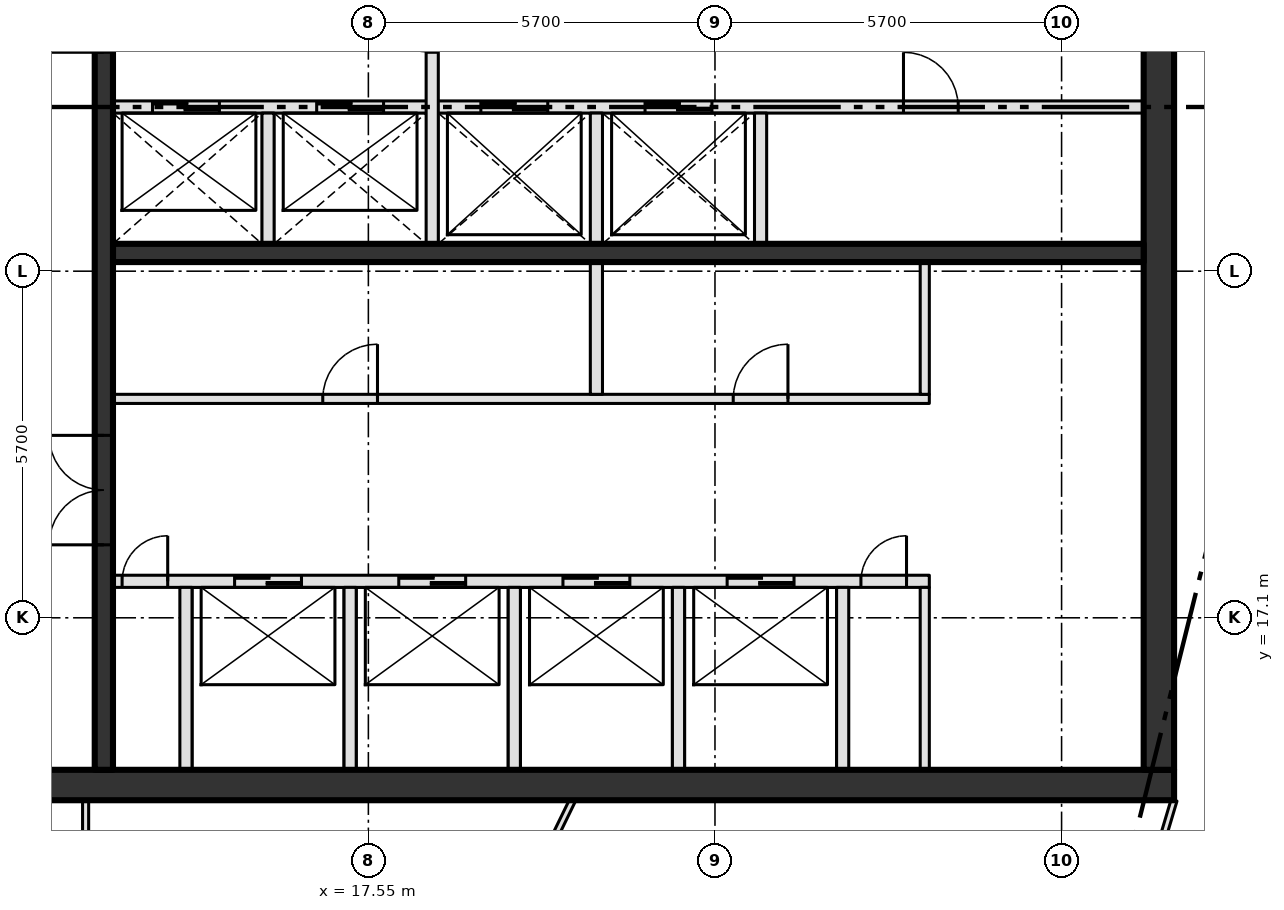
"""IFC4 building model, lengths in metres.
Left out: names, types, materials, properties, quantities, classifications, styles, units other than length and angle.
Written with IfcOpenShell. Run it as: python <this file> out.ifc"""

import sys

from ifc_helpers import new_model, si_unit, direction, frame, frame_2d, origin, place, context, subcontext, project, spatial, rectangle, extrude, element, fill, save


model = new_model("IFC4")
c1 = context("Model", 3, precision=1e-05, world=origin(), true_north=direction((0.0, 1.0)))
c2 = subcontext(c1, "Body", "Model", "MODEL_VIEW")
j1 = project(units=[si_unit("LENGTHUNIT", "METRE"), si_unit("PLANEANGLEUNIT", "RADIAN")], contexts=[c1])
p1 = place(None, origin())
s1 = spatial("IfcSite", under=j1, at=p1, CompositionType="ELEMENT")
p2 = place(p1, origin())
s2 = spatial("IfcBuilding", under=s1, at=p2, CompositionType="ELEMENT")
p3 = place(p2, frame((0.0, 0.0, 366.6)))
s3 = spatial("IfcBuildingStorey", under=s2, at=p3, CompositionType="ELEMENT", Elevation=366.6)
p4 = place(p3, frame((8.0, 14.35, -0.3), z_axis=(0.0, 0.0, 1.0), x_axis=(1.0, 0.0, 0.0)))
e1 = element("IfcWall", 1, at=p4, inside=s3, PredefinedType="SHEAR", context=c2, shape_type="SweptSolid", body=[
    extrude(rectangle(XDim=22.8, YDim=0.5, at=frame_2d((11.4, 0.0))), origin(), (0.0, 0.0, 1.0), 4.2),
])
p5 = place(p4, frame((2.3, 0.0, 0.3)))
e2 = element("IfcOpeningElement", 2, at=p5, cuts=e1, PredefinedType="OPENING", context=c2, shape_type="SweptSolid", body=[
    extrude(rectangle(XDim=1.8, YDim=2.1, at=frame_2d((0.9, 1.05))), frame((0.0, 0.26, 0.0), z_axis=(0.0, -1.0, 0.0), x_axis=(1.0, 0.0, 0.0)), (0.0, 0.0, 1.0), 0.52),
])
p6 = place(p3, frame((30.55, 14.6, -0.3), z_axis=(0.0, 0.0, 1.0), x_axis=(0.0, 1.0, 0.0)))
e3 = element("IfcWall", 3, at=p6, inside=s3, PredefinedType="SHEAR", context=c2, shape_type="SweptSolid", body=[
    extrude(rectangle(XDim=21.1, YDim=0.5, at=frame_2d((10.55, 0.0))), origin(), (0.0, 0.0, 1.0), 4.2),
])
p7 = place(p3, frame((13.35, 17.7, 0.0), z_axis=(0.0, 0.0, 1.0), x_axis=(1.0, 0.0, 0.0)))
e4 = element("IfcWall", 4, at=p7, inside=s3, PredefinedType="SOLIDWALL", context=c2, shape_type="SweptSolid", body=[
    extrude(rectangle(XDim=13.425, YDim=0.2, at=frame_2d((6.712, 0.0))), origin(), (0.0, 0.0, 1.0), 3.9),
])
p8 = place(p7, frame((2.0, 0.0, 0.0)))
e5 = element("IfcOpeningElement", 5, at=p8, cuts=e4, PredefinedType="OPENING", context=c2, shape_type="SweptSolid", body=[
    extrude(rectangle(XDim=1.1, YDim=2.1, at=frame_2d((0.55, 1.05))), frame((0.0, 0.11, 0.0), z_axis=(0.0, -1.0, 0.0), x_axis=(1.0, 0.0, 0.0)), (0.0, 0.0, 1.0), 0.22),
])
p9 = place(p7, frame((4.7, 0.0, 0.0)))
e6 = element("IfcOpeningElement", 6, at=p9, cuts=e4, PredefinedType="OPENING", context=c2, shape_type="SweptSolid", body=[
    extrude(rectangle(XDim=1.1, YDim=2.1, at=frame_2d((0.55, 1.05))), frame((0.0, 0.11, 0.0), z_axis=(0.0, -1.0, 0.0), x_axis=(1.0, 0.0, 0.0)), (0.0, 0.0, 1.0), 0.22),
])
p10 = place(p7, frame((7.4, 0.0, 0.0)))
e7 = element("IfcOpeningElement", 7, at=p10, cuts=e4, PredefinedType="OPENING", context=c2, shape_type="SweptSolid", body=[
    extrude(rectangle(XDim=1.1, YDim=2.1, at=frame_2d((0.55, 1.05))), frame((0.0, 0.11, 0.0), z_axis=(0.0, -1.0, 0.0), x_axis=(1.0, 0.0, 0.0)), (0.0, 0.0, 1.0), 0.22),
])
p11 = place(p7, frame((10.1, 0.0, 0.0)))
e8 = element("IfcOpeningElement", 8, at=p11, cuts=e4, PredefinedType="OPENING", context=c2, shape_type="SweptSolid", body=[
    extrude(rectangle(XDim=1.1, YDim=2.1, at=frame_2d((0.55, 1.05))), frame((0.0, 0.11, 0.0), z_axis=(0.0, -1.0, 0.0), x_axis=(1.0, 0.0, 0.0)), (0.0, 0.0, 1.0), 0.22),
])
p12 = place(p7, frame((0.15, 0.0, 0.0)))
e9 = element("IfcOpeningElement", 9, at=p12, cuts=e4, PredefinedType="OPENING", context=c2, shape_type="SweptSolid", body=[
    extrude(rectangle(XDim=0.75, YDim=2.1, at=frame_2d((0.375, 1.05))), frame((0.0, 0.11, 0.0), z_axis=(0.0, -1.0, 0.0), x_axis=(1.0, 0.0, 0.0)), (0.0, 0.0, 1.0), 0.22),
])
p13 = place(p7, frame((12.3, 0.0, 0.0)))
e10 = element("IfcOpeningElement", 10, at=p13, cuts=e4, PredefinedType="OPENING", context=c2, shape_type="SweptSolid", body=[
    extrude(rectangle(XDim=0.75, YDim=2.1, at=frame_2d((0.375, 1.05))), frame((0.0, 0.11, 0.0), z_axis=(0.0, -1.0, 0.0), x_axis=(1.0, 0.0, 0.0)), (0.0, 0.0, 1.0), 0.22),
])
p14 = place(p3, frame((13.35, 20.7, 0.0), z_axis=(0.0, 0.0, 1.0), x_axis=(1.0, 0.0, 0.0)))
e11 = element("IfcWall", 11, at=p14, inside=s3, PredefinedType="PARTITIONING", context=c2, shape_type="SweptSolid", body=[
    extrude(rectangle(XDim=13.425, YDim=0.15, at=frame_2d((6.712, 0.0))), origin(), (0.0, 0.0, 1.0), 3.9),
])
p15 = place(p14, frame((3.45, 0.0, 0.0)))
e12 = element("IfcOpeningElement", 12, at=p15, cuts=e11, PredefinedType="OPENING", context=c2, shape_type="SweptSolid", body=[
    extrude(rectangle(XDim=0.9, YDim=2.1, at=frame_2d((0.45, 1.05))), frame((0.0, 0.085, 0.0), z_axis=(0.0, -1.0, 0.0), x_axis=(1.0, 0.0, 0.0)), (0.0, 0.0, 1.0), 0.17),
])
p16 = place(p14, frame((10.2, 0.0, 0.0)))
e13 = element("IfcOpeningElement", 13, at=p16, cuts=e11, PredefinedType="OPENING", context=c2, shape_type="SweptSolid", body=[
    extrude(rectangle(XDim=0.9, YDim=2.1, at=frame_2d((0.45, 1.05))), frame((0.0, 0.085, 0.0), z_axis=(0.0, -1.0, 0.0), x_axis=(1.0, 0.0, 0.0)), (0.0, 0.0, 1.0), 0.17),
])
p17 = place(p3, frame((13.35, 23.1, 0.0), z_axis=(0.0, 0.0, 1.0), x_axis=(1.0, 0.0, 0.0)))
e14 = element("IfcWall", 14, at=p17, inside=s3, PredefinedType="SHEAR", context=c2, shape_type="SweptSolid", body=[
    extrude(rectangle(XDim=16.95, YDim=0.3, at=frame_2d((8.475, 0.0))), origin(), (0.0, 0.0, 1.0), 3.9),
])
p18 = place(p3, frame((13.35, 25.5, 0.0), z_axis=(0.0, 0.0, 1.0), x_axis=(1.0, 0.0, 0.0)))
e15 = element("IfcWall", 15, at=p18, inside=s3, PredefinedType="SOLIDWALL", context=c2, shape_type="SweptSolid", body=[
    extrude(rectangle(XDim=16.95, YDim=0.2, at=frame_2d((8.475, 0.0))), origin(), (0.0, 0.0, 1.0), 3.9),
])
p19 = place(p18, frame((0.65, 0.0, 0.0)))
e16 = element("IfcOpeningElement", 16, at=p19, cuts=e15, PredefinedType="OPENING", context=c2, shape_type="SweptSolid", body=[
    extrude(rectangle(XDim=1.1, YDim=2.1, at=frame_2d((0.55, 1.05))), frame((0.0, 0.11, 0.0), z_axis=(0.0, -1.0, 0.0), x_axis=(1.0, 0.0, 0.0)), (0.0, 0.0, 1.0), 0.22),
])
p20 = place(p18, frame((3.35, 0.0, 0.0)))
e17 = element("IfcOpeningElement", 17, at=p20, cuts=e15, PredefinedType="OPENING", context=c2, shape_type="SweptSolid", body=[
    extrude(rectangle(XDim=1.1, YDim=2.1, at=frame_2d((0.55, 1.05))), frame((0.0, 0.11, 0.0), z_axis=(0.0, -1.0, 0.0), x_axis=(1.0, 0.0, 0.0)), (0.0, 0.0, 1.0), 0.22),
])
p21 = place(p18, frame((6.05, 0.0, 0.0)))
e18 = element("IfcOpeningElement", 18, at=p21, cuts=e15, PredefinedType="OPENING", context=c2, shape_type="SweptSolid", body=[
    extrude(rectangle(XDim=1.1, YDim=2.1, at=frame_2d((0.55, 1.05))), frame((0.0, 0.11, 0.0), z_axis=(0.0, -1.0, 0.0), x_axis=(1.0, 0.0, 0.0)), (0.0, 0.0, 1.0), 0.22),
])
p22 = place(p18, frame((8.75, 0.0, 0.0)))
e19 = element("IfcOpeningElement", 19, at=p22, cuts=e15, PredefinedType="OPENING", context=c2, shape_type="SweptSolid", body=[
    extrude(rectangle(XDim=1.1, YDim=2.1, at=frame_2d((0.55, 1.05))), frame((0.0, 0.11, 0.0), z_axis=(0.0, -1.0, 0.0), x_axis=(1.0, 0.0, 0.0)), (0.0, 0.0, 1.0), 0.22),
])
p23 = place(p18, frame((13.0, 0.0, 0.0)))
e20 = element("IfcOpeningElement", 20, at=p23, cuts=e15, PredefinedType="OPENING", context=c2, shape_type="SweptSolid", body=[
    extrude(rectangle(XDim=0.9, YDim=2.1, at=frame_2d((0.45, 1.05))), frame((0.0, 0.11, 0.0), z_axis=(0.0, -1.0, 0.0), x_axis=(1.0, 0.0, 0.0)), (0.0, 0.0, 1.0), 0.22),
])
p24 = place(p3, frame((13.2, 14.6, 0.0), z_axis=(0.0, 0.0, 1.0), x_axis=(0.0, 1.0, 0.0)))
e21 = element("IfcWall", 21, at=p24, inside=s3, PredefinedType="SHEAR", context=c2, shape_type="SweptSolid", body=[
    extrude(rectangle(XDim=21.1, YDim=0.3, at=frame_2d((10.55, 0.0))), origin(), (0.0, 0.0, 1.0), 3.9),
])
p25 = place(p24, frame((3.7, 0.0, 0.0)))
e22 = element("IfcOpeningElement", 22, at=p25, cuts=e21, PredefinedType="OPENING", context=c2, shape_type="SweptSolid", body=[
    extrude(rectangle(XDim=1.8, YDim=2.1, at=frame_2d((0.9, 1.05))), frame((0.0, 0.16, 0.0), z_axis=(0.0, -1.0, 0.0), x_axis=(1.0, 0.0, 0.0)), (0.0, 0.0, 1.0), 0.32),
])
p26 = place(p24, frame((11.8, 0.0, 0.0)))
e23 = element("IfcOpeningElement", 23, at=p26, cuts=e21, PredefinedType="OPENING", context=c2, shape_type="SweptSolid", body=[
    extrude(rectangle(XDim=1.2, YDim=2.1, at=frame_2d((0.6, 1.05))), frame((0.0, 0.16, 0.0), z_axis=(0.0, -1.0, 0.0), x_axis=(1.0, 0.0, 0.0)), (0.0, 0.0, 1.0), 0.32),
])
p27 = place(p3, frame((14.55, 14.6, 0.0), z_axis=(0.0, 0.0, 1.0), x_axis=(0.0, 1.0, 0.0)))
e24 = element("IfcWall", 24, at=p27, inside=s3, PredefinedType="SOLIDWALL", context=c2, shape_type="SweptSolid", body=[
    extrude(rectangle(XDim=3.0, YDim=0.2, at=frame_2d((1.5, 0.0))), origin(), (0.0, 0.0, 1.0), 3.9),
])
p28 = place(p3, frame((15.9, 23.25, 0.0), z_axis=(0.0, 0.0, 1.0), x_axis=(0.0, 1.0, 0.0)))
e25 = element("IfcWall", 25, at=p28, inside=s3, PredefinedType="SOLIDWALL", context=c2, shape_type="SweptSolid", body=[
    extrude(rectangle(XDim=2.15, YDim=0.2, at=frame_2d((1.075, 0.0))), origin(), (0.0, 0.0, 1.0), 3.9),
])
p29 = place(p3, frame((17.25, 14.6, 0.0), z_axis=(0.0, 0.0, 1.0), x_axis=(0.0, 1.0, 0.0)))
e26 = element("IfcWall", 26, at=p29, inside=s3, PredefinedType="SOLIDWALL", context=c2, shape_type="SweptSolid", body=[
    extrude(rectangle(XDim=3.0, YDim=0.2, at=frame_2d((1.5, 0.0))), origin(), (0.0, 0.0, 1.0), 3.9),
])
p30 = place(p3, frame((18.6, 23.25, 0.0), z_axis=(0.0, 0.0, 1.0), x_axis=(0.0, 1.0, 0.0)))
e27 = element("IfcWall", 27, at=p30, inside=s3, PredefinedType="SOLIDWALL", context=c2, shape_type="SweptSolid", body=[
    extrude(rectangle(XDim=5.15, YDim=0.2, at=frame_2d((2.575, 0.0))), origin(), (0.0, 0.0, 1.0), 3.9),
])
p31 = place(p30, frame((3.15, 0.0, 0.0)))
e28 = element("IfcOpeningElement", 28, at=p31, cuts=e27, PredefinedType="OPENING", context=c2, shape_type="SweptSolid", body=[
    extrude(rectangle(XDim=1.2, YDim=2.1, at=frame_2d((0.6, 1.05))), frame((0.0, 0.11, 0.0), z_axis=(0.0, -1.0, 0.0), x_axis=(1.0, 0.0, 0.0)), (0.0, 0.0, 1.0), 0.22),
])
p32 = place(p3, frame((19.95, 14.6, 0.0), z_axis=(0.0, 0.0, 1.0), x_axis=(0.0, 1.0, 0.0)))
e29 = element("IfcWall", 29, at=p32, inside=s3, PredefinedType="SOLIDWALL", context=c2, shape_type="SweptSolid", body=[
    extrude(rectangle(XDim=3.0, YDim=0.2, at=frame_2d((1.5, 0.0))), origin(), (0.0, 0.0, 1.0), 3.9),
])
p33 = place(p3, frame((21.3, 20.775, 0.0), z_axis=(0.0, 0.0, 1.0), x_axis=(0.0, 1.0, 0.0)))
e30 = element("IfcWall", 30, at=p33, inside=s3, PredefinedType="SOLIDWALL", context=c2, shape_type="SweptSolid", body=[
    extrude(rectangle(XDim=4.625, YDim=0.2, at=frame_2d((2.312, 0.0))), origin(), (0.0, 0.0, 1.0), 3.9),
])
p34 = place(p3, frame((22.65, 14.6, 0.0), z_axis=(0.0, 0.0, 1.0), x_axis=(0.0, 1.0, 0.0)))
e31 = element("IfcWall", 31, at=p34, inside=s3, PredefinedType="SOLIDWALL", context=c2, shape_type="SweptSolid", body=[
    extrude(rectangle(XDim=3.0, YDim=0.2, at=frame_2d((1.5, 0.0))), origin(), (0.0, 0.0, 1.0), 3.9),
])
p35 = place(p3, frame((24.0, 23.25, 0.0), z_axis=(0.0, 0.0, 1.0), x_axis=(0.0, 1.0, 0.0)))
e32 = element("IfcWall", 32, at=p35, inside=s3, PredefinedType="SOLIDWALL", context=c2, shape_type="SweptSolid", body=[
    extrude(rectangle(XDim=2.15, YDim=0.2, at=frame_2d((1.075, 0.0))), origin(), (0.0, 0.0, 1.0), 3.9),
])
p36 = place(p3, frame((25.35, 14.6, 0.0), z_axis=(0.0, 0.0, 1.0), x_axis=(0.0, 1.0, 0.0)))
e33 = element("IfcWall", 33, at=p36, inside=s3, PredefinedType="SOLIDWALL", context=c2, shape_type="SweptSolid", body=[
    extrude(rectangle(XDim=3.0, YDim=0.2, at=frame_2d((1.5, 0.0))), origin(), (0.0, 0.0, 1.0), 3.9),
])
p37 = place(p3, frame((26.7, 14.6, 0.0), z_axis=(0.0, 0.0, 1.0), x_axis=(0.0, 1.0, 0.0)))
e34 = element("IfcWall", 34, at=p37, inside=s3, PredefinedType="PARTITIONING", context=c2, shape_type="SweptSolid", body=[
    extrude(rectangle(XDim=3.0, YDim=0.15, at=frame_2d((1.5, 0.0))), origin(), (0.0, 0.0, 1.0), 3.9),
])
p38 = place(p3, frame((26.7, 20.775, 0.0), z_axis=(0.0, 0.0, 1.0), x_axis=(0.0, 1.0, 0.0)))
e35 = element("IfcWall", 35, at=p38, inside=s3, PredefinedType="PARTITIONING", context=c2, shape_type="SweptSolid", body=[
    extrude(rectangle(XDim=2.175, YDim=0.15, at=frame_2d((1.087, 0.0))), origin(), (0.0, 0.0, 1.0), 3.9),
])
p39 = place(p3, frame((12.9, 10.078, 0.0), z_axis=(0.0, 0.0, 1.0), x_axis=(0.0, 1.0, 0.0)))
e36 = element("IfcWall", 36, at=p39, inside=s3, PredefinedType="PARTITIONING", context=c2, shape_type="SweptSolid", body=[
    extrude(rectangle(XDim=4.022, YDim=0.1, at=frame_2d((2.011, 0.0))), origin(), (0.0, 0.0, 1.0), 3.9),
])
p40 = place(p3, frame((28.306, 5.749, 0.0), z_axis=(0.0, 0.0, 1.0), x_axis=(0.286170650389, 0.958178667502, 0.0)))
e37 = element("IfcWall", 37, at=p40, inside=s3, PredefinedType="PARTITIONING", context=c2, shape_type="SweptSolid", body=[
    extrude(rectangle(XDim=8.716, YDim=0.1, at=frame_2d((4.358, 0.0))), origin(), (0.0, 0.0, 1.0), 3.9),
])
p41 = place(p40, frame((1.43, 0.0, 0.0)))
e38 = element("IfcOpeningElement", 38, at=p41, cuts=e37, PredefinedType="OPENING", context=c2, shape_type="SweptSolid", body=[
    extrude(rectangle(XDim=1.0, YDim=2.1, at=frame_2d((0.5, 1.05))), frame((0.0, 0.06, 0.0), z_axis=(0.0, -1.0, 0.0), x_axis=(1.0, 0.0, 0.0)), (0.0, 0.0, 1.0), 0.12),
])
p42 = place(p3, frame((18.105, 8.354, 0.0), z_axis=(0.0, 0.0, 1.0), x_axis=(0.438424384383, 0.898768078638, 0.0)))
e39 = element("IfcWall", 39, at=p42, inside=s3, PredefinedType="PARTITIONING", context=c2, shape_type="SweptSolid", body=[
    extrude(rectangle(XDim=6.393, YDim=0.1, at=frame_2d((3.197, 0.0))), origin(), (0.0, 0.0, 1.0), 3.9),
])
p43 = place(p8, origin())
e40 = element("IfcDoor", 40, at=p43, inside=s3, OperationType="SLIDING_TO_LEFT", PredefinedType="DOOR", context=c2, shape_type="SweptSolid", body=[
    extrude(rectangle(XDim=1.1, YDim=2.1, at=frame_2d((0.55, 1.05))), frame((0.0, 0.025, 0.0), z_axis=(0.0, -1.0, 0.0), x_axis=(1.0, 0.0, 0.0)), (0.0, 0.0, 1.0), 0.05),
])
fill(e5, e40)
p44 = place(p9, origin())
e41 = element("IfcDoor", 41, at=p44, inside=s3, OperationType="SLIDING_TO_LEFT", PredefinedType="DOOR", context=c2, shape_type="SweptSolid", body=[
    extrude(rectangle(XDim=1.1, YDim=2.1, at=frame_2d((0.55, 1.05))), frame((0.0, 0.025, 0.0), z_axis=(0.0, -1.0, 0.0), x_axis=(1.0, 0.0, 0.0)), (0.0, 0.0, 1.0), 0.05),
])
fill(e6, e41)
p45 = place(p10, origin())
e42 = element("IfcDoor", 42, at=p45, inside=s3, OperationType="SLIDING_TO_LEFT", PredefinedType="DOOR", context=c2, shape_type="SweptSolid", body=[
    extrude(rectangle(XDim=1.1, YDim=2.1, at=frame_2d((0.55, 1.05))), frame((0.0, 0.025, 0.0), z_axis=(0.0, -1.0, 0.0), x_axis=(1.0, 0.0, 0.0)), (0.0, 0.0, 1.0), 0.05),
])
fill(e7, e42)
p46 = place(p11, origin())
e43 = element("IfcDoor", 43, at=p46, inside=s3, OperationType="SLIDING_TO_LEFT", PredefinedType="DOOR", context=c2, shape_type="SweptSolid", body=[
    extrude(rectangle(XDim=1.1, YDim=2.1, at=frame_2d((0.55, 1.05))), frame((0.0, 0.025, 0.0), z_axis=(0.0, -1.0, 0.0), x_axis=(1.0, 0.0, 0.0)), (0.0, 0.0, 1.0), 0.05),
])
fill(e8, e43)
p47 = place(p19, origin())
e44 = element("IfcDoor", 44, at=p47, inside=s3, OperationType="SLIDING_TO_LEFT", PredefinedType="DOOR", context=c2, shape_type="SweptSolid", body=[
    extrude(rectangle(XDim=1.1, YDim=2.1, at=frame_2d((0.55, 1.05))), frame((0.0, 0.025, 0.0), z_axis=(0.0, -1.0, 0.0), x_axis=(1.0, 0.0, 0.0)), (0.0, 0.0, 1.0), 0.05),
])
fill(e16, e44)
p48 = place(p20, origin())
e45 = element("IfcDoor", 45, at=p48, inside=s3, OperationType="SLIDING_TO_LEFT", PredefinedType="DOOR", context=c2, shape_type="SweptSolid", body=[
    extrude(rectangle(XDim=1.1, YDim=2.1, at=frame_2d((0.55, 1.05))), frame((0.0, 0.025, 0.0), z_axis=(0.0, -1.0, 0.0), x_axis=(1.0, 0.0, 0.0)), (0.0, 0.0, 1.0), 0.05),
])
fill(e17, e45)
p49 = place(p21, origin())
e46 = element("IfcDoor", 46, at=p49, inside=s3, OperationType="SLIDING_TO_LEFT", PredefinedType="DOOR", context=c2, shape_type="SweptSolid", body=[
    extrude(rectangle(XDim=1.1, YDim=2.1, at=frame_2d((0.55, 1.05))), frame((0.0, 0.025, 0.0), z_axis=(0.0, -1.0, 0.0), x_axis=(1.0, 0.0, 0.0)), (0.0, 0.0, 1.0), 0.05),
])
fill(e18, e46)
p50 = place(p22, origin())
e47 = element("IfcDoor", 47, at=p50, inside=s3, OperationType="SLIDING_TO_LEFT", PredefinedType="DOOR", context=c2, shape_type="SweptSolid", body=[
    extrude(rectangle(XDim=1.1, YDim=2.1, at=frame_2d((0.55, 1.05))), frame((0.0, 0.025, 0.0), z_axis=(0.0, -1.0, 0.0), x_axis=(1.0, 0.0, 0.0)), (0.0, 0.0, 1.0), 0.05),
])
fill(e19, e47)
p51 = place(p12, origin())
e48 = element("IfcDoor", 48, at=p51, inside=s3, OperationType="SINGLE_SWING_RIGHT", PredefinedType="DOOR", context=c2, shape_type="SweptSolid", body=[
    extrude(rectangle(XDim=0.75, YDim=2.1, at=frame_2d((0.375, 1.05))), frame((0.0, 0.025, 0.0), z_axis=(0.0, -1.0, 0.0), x_axis=(1.0, 0.0, 0.0)), (0.0, 0.0, 1.0), 0.05),
])
fill(e9, e48)
p52 = place(p13, origin())
e49 = element("IfcDoor", 49, at=p52, inside=s3, OperationType="SINGLE_SWING_RIGHT", PredefinedType="DOOR", context=c2, shape_type="SweptSolid", body=[
    extrude(rectangle(XDim=0.75, YDim=2.1, at=frame_2d((0.375, 1.05))), frame((0.0, 0.025, 0.0), z_axis=(0.0, -1.0, 0.0), x_axis=(1.0, 0.0, 0.0)), (0.0, 0.0, 1.0), 0.05),
])
fill(e10, e49)
p53 = place(p15, origin())
e50 = element("IfcDoor", 50, at=p53, inside=s3, OperationType="SINGLE_SWING_RIGHT", PredefinedType="DOOR", context=c2, shape_type="SweptSolid", body=[
    extrude(rectangle(XDim=0.9, YDim=2.1, at=frame_2d((0.45, 1.05))), frame((0.0, 0.025, 0.0), z_axis=(0.0, -1.0, 0.0), x_axis=(1.0, 0.0, 0.0)), (0.0, 0.0, 1.0), 0.05),
])
fill(e12, e50)
p54 = place(p16, origin())
e51 = element("IfcDoor", 51, at=p54, inside=s3, OperationType="SINGLE_SWING_RIGHT", PredefinedType="DOOR", context=c2, shape_type="SweptSolid", body=[
    extrude(rectangle(XDim=0.9, YDim=2.1, at=frame_2d((0.45, 1.05))), frame((0.0, 0.025, 0.0), z_axis=(0.0, -1.0, 0.0), x_axis=(1.0, 0.0, 0.0)), (0.0, 0.0, 1.0), 0.05),
])
fill(e13, e51)
p55 = place(p23, origin())
e52 = element("IfcDoor", 52, at=p55, inside=s3, OperationType="SINGLE_SWING_LEFT", PredefinedType="DOOR", context=c2, shape_type="SweptSolid", body=[
    extrude(rectangle(XDim=0.9, YDim=2.1, at=frame_2d((0.45, 1.05))), frame((0.0, 0.025, 0.0), z_axis=(0.0, -1.0, 0.0), x_axis=(1.0, 0.0, 0.0)), (0.0, 0.0, 1.0), 0.05),
])
fill(e20, e52)
p56 = place(p25, origin())
e53 = element("IfcDoor", 53, at=p56, inside=s3, OperationType="DOUBLE_DOOR_SINGLE_SWING", PredefinedType="DOOR", context=c2, shape_type="SweptSolid", body=[
    extrude(rectangle(XDim=1.8, YDim=2.1, at=frame_2d((0.9, 1.05))), frame((0.0, 0.025, 0.0), z_axis=(0.0, -1.0, 0.0), x_axis=(1.0, 0.0, 0.0)), (0.0, 0.0, 1.0), 0.05),
])
fill(e22, e53)
save(model, sys.argv[1])
